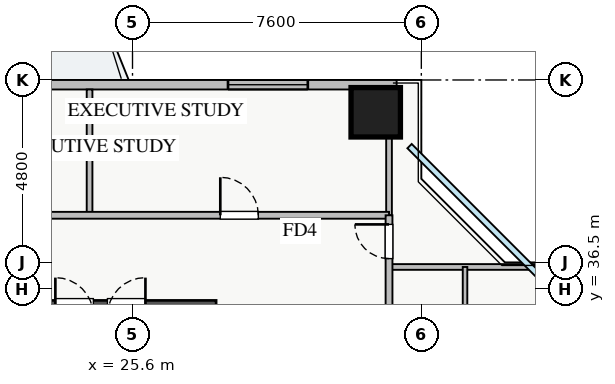
"""IFC4 building model, lengths in metres.
Left out: names, types, materials, properties, quantities, classifications, styles, units other than length and angle.
Written with IfcOpenShell. Run it as: python <this file> out.ifc"""

import sys

from ifc_helpers import new_model, si_unit, direction, frame, frame_2d, origin, origin_2d, place, context, subcontext, project, spatial, rectangle, extrude, source, transform, mapped, element, fill, save


model = new_model("IFC4")
c1 = context("Model", 3, precision=1e-05, world=origin(), true_north=direction((0.0, 1.0)))
c2 = subcontext(c1, "Body", "Model", "MODEL_VIEW")
j1 = project(units=[si_unit("LENGTHUNIT", "METRE"), si_unit("PLANEANGLEUNIT", "RADIAN")], contexts=[c1])
p1 = place(None, origin())
s1 = spatial("IfcSite", under=j1, at=p1, CompositionType="ELEMENT")
p2 = place(p1, origin())
s2 = spatial("IfcBuilding", under=s1, at=p2, CompositionType="ELEMENT")
p3 = place(p2, frame((0.0, 0.0, 89.25)))
s3 = spatial("IfcBuildingStorey", under=s2, at=p3, CompositionType="ELEMENT", Elevation=89.25)
p4 = place(p3, frame((10.2, 35.8, 0.0), z_axis=(0.0, 0.0, 1.0), x_axis=(1.0, 0.0, 0.0)))
e1 = element("IfcWall", 1, at=p4, inside=s3, PredefinedType="SHEAR", context=c2, shape_type="SweptSolid", body=[
    extrude(rectangle(XDim=17.6, YDim=0.8, at=frame_2d((8.8, 0.0))), origin(), (0.0, 0.0, 1.0), 3.25),
])
p5 = place(p4, frame((1.15, 0.0, 0.0)))
e2 = element("IfcOpeningElement", 2, at=p5, cuts=e1, PredefinedType="OPENING", context=c2, shape_type="SweptSolid", body=[
    extrude(rectangle(XDim=1.1, YDim=2.05, at=frame_2d((0.55, 1.025))), frame((0.0, 0.41, 0.0), z_axis=(0.0, -1.0, 0.0), x_axis=(1.0, 0.0, 0.0)), (0.0, 0.0, 1.0), 0.82),
])
p6 = place(p4, frame((8.3, 0.0, 0.0)))
e3 = element("IfcOpeningElement", 3, at=p6, cuts=e1, PredefinedType="OPENING", context=c2, shape_type="SweptSolid", body=[
    extrude(rectangle(XDim=1.1, YDim=2.05, at=frame_2d((0.55, 1.025))), frame((0.0, 0.41, 0.0), z_axis=(0.0, -1.0, 0.0), x_axis=(1.0, 0.0, 0.0)), (0.0, 0.0, 1.0), 0.82),
])
p7 = place(p4, frame((10.05, 0.0, 0.0)))
e4 = element("IfcOpeningElement", 4, at=p7, cuts=e1, PredefinedType="OPENING", context=c2, shape_type="SweptSolid", body=[
    extrude(rectangle(XDim=1.1, YDim=2.05, at=frame_2d((0.55, 1.025))), frame((0.0, 0.41, 0.0), z_axis=(0.0, -1.0, 0.0), x_axis=(1.0, 0.0, 0.0)), (0.0, 0.0, 1.0), 0.82),
])
p8 = place(p4, frame((14.74, 0.0, 0.0)))
e5 = element("IfcOpeningElement", 5, at=p8, cuts=e1, PredefinedType="OPENING", context=c2, shape_type="SweptSolid", body=[
    extrude(rectangle(XDim=1.0, YDim=2.05, at=frame_2d((0.5, 1.025))), frame((0.0, 0.41, 0.0), z_axis=(0.0, -1.0, 0.0), x_axis=(1.0, 0.0, 0.0)), (0.0, 0.0, 1.0), 0.82),
])
p9 = place(p4, frame((11.835, 0.0, 0.0)))
e6 = element("IfcOpeningElement", 6, at=p9, cuts=e1, PredefinedType="OPENING", context=c2, shape_type="SweptSolid", body=[
    extrude(rectangle(XDim=1.0, YDim=2.05, at=frame_2d((0.5, 1.025))), frame((0.0, 0.41, 0.0), z_axis=(0.0, -1.0, 0.0), x_axis=(1.0, 0.0, 0.0)), (0.0, 0.0, 1.0), 0.82),
])
p10 = place(p4, frame((13.37, 0.0, 0.0)))
e7 = element("IfcOpeningElement", 7, at=p10, cuts=e1, PredefinedType="OPENING", context=c2, shape_type="SweptSolid", body=[
    extrude(rectangle(XDim=1.0, YDim=2.05, at=frame_2d((0.5, 1.025))), frame((0.0, 0.41, 0.0), z_axis=(0.0, -1.0, 0.0), x_axis=(1.0, 0.0, 0.0)), (0.0, 0.0, 1.0), 0.82),
])
m1 = source(origin(), c2, "Body", "SweptSolid", [
    extrude(rectangle(XDim=1.3, YDim=1.3, at=origin_2d()), origin(), (0.0, 0.0, 1.0), 3.25),
])
p11 = place(p3, frame((32.0, 41.15, 0.0), z_axis=(0.0, 0.0, 1.0), x_axis=(1.0, 0.0, 0.0)))
e8 = element("IfcColumn", 8, at=p11, inside=s3, PredefinedType="COLUMN", context=c2, shape_type="MappedRepresentation", body=[
    mapped(m1, transform((0.0, 0.0, 0.0), x_axis=(1.0, 0.0, 0.0), y_axis=(0.0, 1.0, 0.0), z_axis=(0.0, 0.0, 1.0), scale=1.0)),
])
p12 = place(p3, frame((5.45, 41.875, 0.0), z_axis=(0.0, 0.0, 1.0), x_axis=(1.0, 0.0, 0.0)))
e9 = element("IfcWall", 9, at=p12, inside=s3, PredefinedType="STANDARD", context=c2, shape_type="SweptSolid", body=[
    extrude(rectangle(XDim=27.1, YDim=0.25, at=frame_2d((13.55, 0.0))), origin(), (0.0, 0.0, 1.0), 2.57),
])
p13 = place(p12, frame((14.4, 0.0, 0.0)))
e10 = element("IfcOpeningElement", 10, at=p13, cuts=e9, PredefinedType="OPENING", context=c2, shape_type="SweptSolid", body=[
    extrude(rectangle(XDim=1.2, YDim=2.1, at=frame_2d((0.6, 1.05))), frame((0.0, 0.135, 0.0), z_axis=(0.0, -1.0, 0.0), x_axis=(1.0, 0.0, 0.0)), (0.0, 0.0, 1.0), 0.27),
])
p14 = place(p12, frame((1.45, 0.0, 0.9)))
e11 = element("IfcOpeningElement", 11, at=p14, cuts=e9, PredefinedType="OPENING", context=c2, shape_type="SweptSolid", body=[
    extrude(rectangle(XDim=1.5, YDim=1.5, at=frame_2d((0.75, 0.75))), frame((0.0, 0.135, 0.0), z_axis=(0.0, -1.0, 0.0), x_axis=(1.0, 0.0, 0.0)), (0.0, 0.0, 1.0), 0.27),
])
p15 = place(p12, frame((8.024, 0.0, 0.9)))
e12 = element("IfcOpeningElement", 12, at=p15, cuts=e9, PredefinedType="OPENING", context=c2, shape_type="SweptSolid", body=[
    extrude(rectangle(XDim=1.8, YDim=1.5, at=frame_2d((0.9, 0.75))), frame((0.0, 0.135, 0.0), z_axis=(0.0, -1.0, 0.0), x_axis=(1.0, 0.0, 0.0)), (0.0, 0.0, 1.0), 0.27),
])
p16 = place(p12, frame((16.188, 0.0, 0.9)))
e13 = element("IfcOpeningElement", 13, at=p16, cuts=e9, PredefinedType="OPENING", context=c2, shape_type="SweptSolid", body=[
    extrude(rectangle(XDim=1.5, YDim=1.45, at=frame_2d((0.75, 0.725))), frame((0.0, 0.135, 0.0), z_axis=(0.0, -1.0, 0.0), x_axis=(1.0, 0.0, 0.0)), (0.0, 0.0, 1.0), 0.27),
])
p17 = place(p12, frame((22.663, 0.0, 0.9)))
e14 = element("IfcOpeningElement", 14, at=p17, cuts=e9, PredefinedType="OPENING", context=c2, shape_type="SweptSolid", body=[
    extrude(rectangle(XDim=2.1, YDim=1.48, at=frame_2d((1.05, 0.74))), frame((0.0, 0.135, 0.0), z_axis=(0.0, -1.0, 0.0), x_axis=(1.0, 0.0, 0.0)), (0.0, 0.0, 1.0), 0.27),
])
p18 = place(p12, frame((5.084, 0.0, 0.9)))
e15 = element("IfcOpeningElement", 15, at=p18, cuts=e9, PredefinedType="OPENING", context=c2, shape_type="SweptSolid", body=[
    extrude(rectangle(XDim=2.4, YDim=1.5, at=frame_2d((1.2, 0.75))), frame((0.0, 0.135, 0.0), z_axis=(0.0, -1.0, 0.0), x_axis=(1.0, 0.0, 0.0)), (0.0, 0.0, 1.0), 0.27),
])
p19 = place(p12, frame((11.208, 0.0, 0.9)))
e16 = element("IfcOpeningElement", 16, at=p19, cuts=e9, PredefinedType="OPENING", context=c2, shape_type="SweptSolid", body=[
    extrude(rectangle(XDim=2.4, YDim=1.5, at=frame_2d((1.2, 0.75))), frame((0.0, 0.135, 0.0), z_axis=(0.0, -1.0, 0.0), x_axis=(1.0, 0.0, 0.0)), (0.0, 0.0, 1.0), 0.27),
])
for number, where, z_axis, x_axis in (
    (17, (24.47, 38.44, 0.0), (0.0, 0.0, 1.0), (0.0, 1.0, 0.0)),
    (18, (32.35, 38.44, 0.0), (0.0, 0.0, 1.0), (0.0, 1.0, 0.0)),
):
    element("IfcWall", number, at=place(p3, frame(where, z_axis=z_axis, x_axis=x_axis)), inside=s3, PredefinedType="PARTITIONING", context=c2, shape_type="SweptSolid", body=[
        extrude(rectangle(XDim=3.31, YDim=0.15, at=frame_2d((1.655, 0.0))), origin(), (0.0, 0.0, 1.0), 3.03),
    ])
p20 = place(p3, frame((8.72, 38.44, 0.0), z_axis=(0.0, 0.0, 1.0), x_axis=(1.0, 0.0, 0.0)))
e19 = element("IfcWall", 19, at=p20, inside=s3, PredefinedType="PARTITIONING", context=c2, shape_type="SweptSolid", body=[
    extrude(rectangle(XDim=23.63, YDim=0.18, at=frame_2d((11.815, 0.0))), origin(), (0.0, 0.0, 1.0), 3.03),
])
p21 = place(p20, frame((3.065, 0.0, 0.0)))
e20 = element("IfcOpeningElement", 20, at=p21, cuts=e19, PredefinedType="OPENING", context=c2, shape_type="SweptSolid", body=[
    extrude(rectangle(XDim=1.0, YDim=2.05, at=frame_2d((0.5, 1.025))), frame((0.0, 0.1, 0.0), z_axis=(0.0, -1.0, 0.0), x_axis=(1.0, 0.0, 0.0)), (0.0, 0.0, 1.0), 0.2),
])
p22 = place(p20, frame((10.94, 0.0, 0.0)))
e21 = element("IfcOpeningElement", 21, at=p22, cuts=e19, PredefinedType="OPENING", context=c2, shape_type="SweptSolid", body=[
    extrude(rectangle(XDim=1.0, YDim=2.05, at=frame_2d((0.5, 1.025))), frame((0.0, 0.1, 0.0), z_axis=(0.0, -1.0, 0.0), x_axis=(1.0, 0.0, 0.0)), (0.0, 0.0, 1.0), 0.2),
])
p23 = place(p20, frame((19.19, 0.0, 0.0)))
e22 = element("IfcOpeningElement", 22, at=p23, cuts=e19, PredefinedType="OPENING", context=c2, shape_type="SweptSolid", body=[
    extrude(rectangle(XDim=1.0, YDim=2.05, at=frame_2d((0.5, 1.025))), frame((0.0, 0.1, 0.0), z_axis=(0.0, -1.0, 0.0), x_axis=(1.0, 0.0, 0.0)), (0.0, 0.0, 1.0), 0.2),
])
p24 = place(p3, frame((32.35, 37.08, 0.0), z_axis=(0.0, 0.0, 1.0), x_axis=(1.0, 0.0, 0.0)))
e23 = element("IfcWall", 23, at=p24, inside=s3, PredefinedType="PARTITIONING", context=c2, shape_type="SweptSolid", body=[
    extrude(rectangle(XDim=5.4, YDim=0.15, at=frame_2d((2.7, 0.0))), origin(), (0.0, 0.0, 1.0), 3.03),
])
p25 = place(p3, frame((34.35, 30.45, 0.0), z_axis=(0.0, 0.0, 1.0), x_axis=(0.0, 1.0, 0.0)))
e24 = element("IfcWall", 24, at=p25, inside=s3, PredefinedType="PLUMBINGWALL", context=c2, shape_type="SweptSolid", body=[
    extrude(rectangle(XDim=6.63, YDim=0.12, at=frame_2d((3.315, 0.0))), origin(), (0.0, 0.0, 1.0), 3.03),
])
p26 = place(p3, frame((32.35, 7.21, 0.0), z_axis=(0.0, 0.0, 1.0), x_axis=(0.0, 1.0, 0.0)))
e25 = element("IfcWall", 25, at=p26, inside=s3, PredefinedType="PARTITIONING", context=c2, shape_type="SweptSolid", body=[
    extrude(rectangle(XDim=31.23, YDim=0.18, at=frame_2d((15.615, 0.0))), origin(), (0.0, 0.0, 1.0), 2.725),
])
p27 = place(p26, frame((30.09, 0.0, 0.0)))
e26 = element("IfcOpeningElement", 26, at=p27, cuts=e25, PredefinedType="OPENING", context=c2, shape_type="SweptSolid", body=[
    extrude(rectangle(XDim=0.9, YDim=2.05, at=frame_2d((0.45, 1.025))), frame((0.0, 0.1, 0.0), z_axis=(0.0, -1.0, 0.0), x_axis=(1.0, 0.0, 0.0)), (0.0, 0.0, 1.0), 0.2),
])
p28 = place(p26, frame((0.415, 0.0, 0.0)))
e27 = element("IfcOpeningElement", 27, at=p28, cuts=e25, PredefinedType="OPENING", context=c2, shape_type="SweptSolid", body=[
    extrude(rectangle(XDim=0.9, YDim=2.05, at=frame_2d((0.45, 1.025))), frame((0.0, 0.1, 0.0), z_axis=(0.0, -1.0, 0.0), x_axis=(1.0, 0.0, 0.0)), (0.0, 0.0, 1.0), 0.2),
])
p29 = place(p26, frame((4.73, 0.0, 0.0)))
e28 = element("IfcOpeningElement", 28, at=p29, cuts=e25, PredefinedType="OPENING", context=c2, shape_type="SweptSolid", body=[
    extrude(rectangle(XDim=1.0, YDim=2.05, at=frame_2d((0.5, 1.025))), frame((0.0, 0.1, 0.0), z_axis=(0.0, -1.0, 0.0), x_axis=(1.0, 0.0, 0.0)), (0.0, 0.0, 1.0), 0.2),
])
p30 = place(p26, frame((18.655, 0.0, 0.0)))
e29 = element("IfcOpeningElement", 29, at=p30, cuts=e25, PredefinedType="OPENING", context=c2, shape_type="SweptSolid", body=[
    extrude(rectangle(XDim=1.0, YDim=2.05, at=frame_2d((0.5, 1.025))), frame((0.0, 0.1, 0.0), z_axis=(0.0, -1.0, 0.0), x_axis=(1.0, 0.0, 0.0)), (0.0, 0.0, 1.0), 0.2),
])
m2 = source(origin(), c2, "Body", "SweptSolid", [
    extrude(rectangle(XDim=2.1, YDim=1.48, at=frame_2d((1.05, 0.74))), frame((0.0, 0.03, 0.0), z_axis=(0.0, -1.0, 0.0), x_axis=(1.0, 0.0, 0.0)), (0.0, 0.0, 1.0), 0.06),
])
p31 = place(p17, origin())
e30 = element("IfcWindow", 30, at=p31, inside=s3, PartitioningType="TRIPLE_PANEL_VERTICAL", PredefinedType="WINDOW", context=c2, shape_type="MappedRepresentation", body=[
    mapped(m2, transform((0.0, 0.0, 0.0), x_axis=(1.0, 0.0, 0.0), y_axis=(0.0, 1.0, 0.0), z_axis=(0.0, 0.0, 1.0), scale=1.0)),
])
fill(e14, e30)
m3 = source(origin(), c2, "Body", "SweptSolid", [
    extrude(rectangle(XDim=1.0, YDim=2.05, at=frame_2d((0.5, 1.025))), frame((0.0, 0.025, 0.0), z_axis=(0.0, -1.0, 0.0), x_axis=(1.0, 0.0, 0.0)), (0.0, 0.0, 1.0), 0.05),
])
p32 = place(p23, origin())
e31 = element("IfcDoor", 31, at=p32, inside=s3, OperationType="SINGLE_SWING_LEFT", PredefinedType="DOOR", context=c2, shape_type="MappedRepresentation", body=[
    mapped(m3, transform((0.0, 0.0, 0.0), x_axis=(1.0, 0.0, 0.0), y_axis=(0.0, 1.0, 0.0), z_axis=(0.0, 0.0, 1.0), scale=1.0)),
])
fill(e22, e31)
m4 = source(origin(), c2, "Body", "SweptSolid", [
    extrude(rectangle(XDim=0.9, YDim=2.05, at=frame_2d((0.45, 1.025))), frame((0.0, 0.025, 0.0), z_axis=(0.0, -1.0, 0.0), x_axis=(1.0, 0.0, 0.0)), (0.0, 0.0, 1.0), 0.05),
])
p33 = place(p27, origin())
e32 = element("IfcDoor", 32, at=p33, inside=s3, OperationType="SINGLE_SWING_RIGHT", PredefinedType="DOOR", context=c2, shape_type="MappedRepresentation", body=[
    mapped(m4, transform((0.0, 0.0, 0.0), x_axis=(1.0, 0.0, 0.0), y_axis=(0.0, 1.0, 0.0), z_axis=(0.0, 0.0, 1.0), scale=1.0)),
])
fill(e26, e32)
save(model, sys.argv[1])
